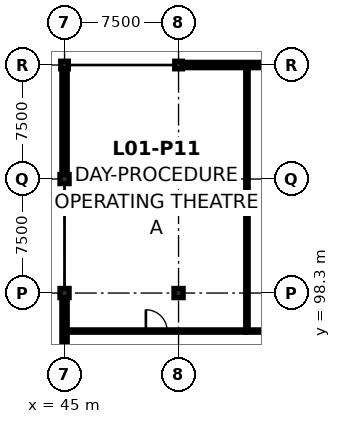
"""IFC4 building model, lengths in metres.
Left out: names, types, materials, properties, quantities, classifications, styles, units other than length and angle.
Written with IfcOpenShell. Run it as: python <this file> out.ifc"""

import sys

from ifc_helpers import new_model, si_unit, direction, frame, frame_2d, origin, origin_2d, place, context, subcontext, project, spatial, rectangle, extrude, element, fill, save


model = new_model("IFC4")
c1 = context("Model", 3, precision=1e-05, world=origin(), true_north=direction((0.0, 1.0)))
c2 = subcontext(c1, "Body", "Model", "MODEL_VIEW")
j1 = project(units=[si_unit("LENGTHUNIT", "METRE"), si_unit("PLANEANGLEUNIT", "RADIAN")], contexts=[c1])
p1 = place(None, origin())
s1 = spatial("IfcSite", under=j1, at=p1, CompositionType="ELEMENT")
p2 = place(p1, origin())
s2 = spatial("IfcBuilding", under=s1, at=p2, CompositionType="ELEMENT")
p3 = place(p2, frame((0.0, 0.0, 5.0)))
s3 = spatial("IfcBuildingStorey", under=s2, at=p3, CompositionType="ELEMENT", Elevation=5.0)
for number, where, z_axis, x_axis in (
    (1, (45.0, 98.3, 0.0), (0.0, 0.0, 1.0), (1.0, 0.0, 0.0)),
    (2, (45.0, 105.8, 0.0), (0.0, 0.0, 1.0), (1.0, 0.0, 0.0)),
):
    element("IfcColumn", number, at=place(p3, frame(where, z_axis=z_axis, x_axis=x_axis)), inside=s3, PredefinedType="COLUMN", context=c2, shape_type="SweptSolid", body=[
        extrude(rectangle(XDim=0.6, YDim=0.6, at=origin_2d()), origin(), (0.0, 0.0, 1.0), 4.2),
    ])
p4 = place(p3, frame((45.0, 113.3, 0.0), z_axis=(0.0, 0.0, 1.0), x_axis=(1.0, 0.0, 0.0)))
e3 = element("IfcColumn", 3, at=p4, inside=s3, PredefinedType="COLUMN", context=c2, shape_type="SweptSolid", body=[
    extrude(rectangle(XDim=0.5, YDim=0.5, at=origin_2d()), origin(), (0.0, 0.0, 1.0), 5.636),
])
for number, where, z_axis, x_axis in (
    (4, (52.5, 98.3, 0.0), (0.0, 0.0, 1.0), (1.0, 0.0, 0.0)),
    (5, (52.5, 105.8, 0.0), (0.0, 0.0, 1.0), (1.0, 0.0, 0.0)),
):
    element("IfcColumn", number, at=place(p3, frame(where, z_axis=z_axis, x_axis=x_axis)), inside=s3, PredefinedType="COLUMN", context=c2, shape_type="SweptSolid", body=[
        extrude(rectangle(XDim=0.6, YDim=0.6, at=origin_2d()), origin(), (0.0, 0.0, 1.0), 4.2),
    ])
p5 = place(p3, frame((52.5, 113.3, 0.0), z_axis=(0.0, 0.0, 1.0), x_axis=(1.0, 0.0, 0.0)))
e6 = element("IfcColumn", 6, at=p5, inside=s3, PredefinedType="COLUMN", context=c2, shape_type="SweptSolid", body=[
    extrude(rectangle(XDim=0.5, YDim=0.5, at=origin_2d()), origin(), (0.0, 0.0, 1.0), 5.636),
])
p6 = place(p3, frame((45.0, 91.075, 0.0), z_axis=(0.0, 0.0, 1.0), x_axis=(0.0, 1.0, 0.0)))
e7 = element("IfcWall", 7, at=p6, inside=s3, PredefinedType="SOLIDWALL", context=c2, shape_type="SweptSolid", body=[
    extrude(rectangle(XDim=6.925, YDim=0.35, at=frame_2d((3.462, 0.0))), origin(), (0.0, 0.0, 1.0), 3.485),
])
p7 = place(p3, frame((45.0, 106.1, 0.0), z_axis=(0.0, 0.0, 1.0), x_axis=(0.0, 1.0, 0.0)))
e8 = element("IfcWall", 8, at=p7, inside=s3, PredefinedType="SOLIDWALL", context=c2, shape_type="SweptSolid", body=[
    extrude(rectangle(XDim=6.95, YDim=0.35, at=frame_2d((3.475, 0.0))), origin(), (0.0, 0.0, 1.0), 3.535),
])
p8 = place(p7, frame((2.775, 0.0, 0.9)))
e9 = element("IfcOpeningElement", 9, at=p8, cuts=e8, PredefinedType="OPENING", context=c2, shape_type="SweptSolid", body=[
    extrude(rectangle(XDim=1.4, YDim=1.5, at=frame_2d((0.7, 0.75))), frame((0.0, 0.187, 0.0), z_axis=(0.0, -1.0, 0.0), x_axis=(1.0, 0.0, 0.0)), (0.0, 0.0, 1.0), 0.374),
])
p9 = place(p3, frame((52.75, 113.3, 0.0), z_axis=(0.0, 0.0, 1.0), x_axis=(1.0, 0.0, 0.0)))
e10 = element("IfcWall", 10, at=p9, inside=s3, PredefinedType="SOLIDWALL", context=c2, shape_type="SweptSolid", body=[
    extrude(rectangle(XDim=7.0, YDim=0.35, at=frame_2d((3.5, 0.0))), origin(), (0.0, 0.0, 1.0), 4.17),
])
p10 = place(p3, frame((45.187, 95.8, 0.0), z_axis=(0.0, 0.0, 1.0), x_axis=(1.0, 0.0, 0.0)))
e11 = element("IfcWall", 11, at=p10, inside=s3, PredefinedType="PARTITIONING", context=c2, shape_type="SweptSolid", body=[
    extrude(rectangle(XDim=11.728, YDim=0.15, at=frame_2d((5.864, 0.0))), origin(), (0.0, 0.0, 1.0), 3.485),
])
p11 = place(p10, frame((5.164, 0.0, 0.0)))
e12 = element("IfcOpeningElement", 12, at=p11, cuts=e11, PredefinedType="OPENING", context=c2, shape_type="SweptSolid", body=[
    extrude(rectangle(XDim=1.4, YDim=2.25, at=frame_2d((0.7, 1.125))), frame((0.0, 0.087, 0.0), z_axis=(0.0, -1.0, 0.0), x_axis=(1.0, 0.0, 0.0)), (0.0, 0.0, 1.0), 0.174),
])
p12 = place(p3, frame((56.927, 95.8, 0.0), z_axis=(0.0, 0.0, 1.0), x_axis=(1.0, 0.0, 0.0)))
e13 = element("IfcWall", 13, at=p12, inside=s3, PredefinedType="PARTITIONING", context=c2, shape_type="SweptSolid", body=[
    extrude(rectangle(XDim=11.588, YDim=0.15, at=frame_2d((5.794, 0.0))), origin(), (0.0, 0.0, 1.0), 3.485),
])
p13 = place(p12, frame((5.069, 0.0, 0.0)))
e14 = element("IfcOpeningElement", 14, at=p13, cuts=e13, PredefinedType="OPENING", context=c2, shape_type="SweptSolid", body=[
    extrude(rectangle(XDim=1.45, YDim=2.26, at=frame_2d((0.725, 1.13))), frame((0.0, 0.087, 0.0), z_axis=(0.0, -1.0, 0.0), x_axis=(1.0, 0.0, 0.0)), (0.0, 0.0, 1.0), 0.174),
])
p14 = place(p3, frame((57.0, 95.887, 0.0), z_axis=(0.0, 0.0, 1.0), x_axis=(0.0, 1.0, 0.0)))
e15 = element("IfcWall", 15, at=p14, inside=s3, PredefinedType="PARTITIONING", context=c2, shape_type="SweptSolid", body=[
    extrude(rectangle(XDim=17.226, YDim=0.16, at=frame_2d((8.613, 0.0))), origin(), (0.0, 0.0, 1.0), 3.485),
])
p15 = place(p8, origin())
e16 = element("IfcWindow", 16, at=p15, inside=s3, PartitioningType="SINGLE_PANEL", PredefinedType="WINDOW", context=c2, shape_type="SweptSolid", body=[
    extrude(rectangle(XDim=1.4, YDim=1.5, at=frame_2d((0.7, 0.75))), frame((0.0, 0.03, 0.0), z_axis=(0.0, -1.0, 0.0), x_axis=(1.0, 0.0, 0.0)), (0.0, 0.0, 1.0), 0.06),
])
fill(e9, e16)
p16 = place(p11, origin())
e17 = element("IfcDoor", 17, at=p16, inside=s3, OperationType="SINGLE_SWING_LEFT", PredefinedType="DOOR", context=c2, shape_type="SweptSolid", body=[
    extrude(rectangle(XDim=1.4, YDim=2.25, at=frame_2d((0.7, 1.125))), frame((0.0, 0.025, 0.0), z_axis=(0.0, -1.0, 0.0), x_axis=(1.0, 0.0, 0.0)), (0.0, 0.0, 1.0), 0.05),
])
fill(e12, e17)
save(model, sys.argv[1])
